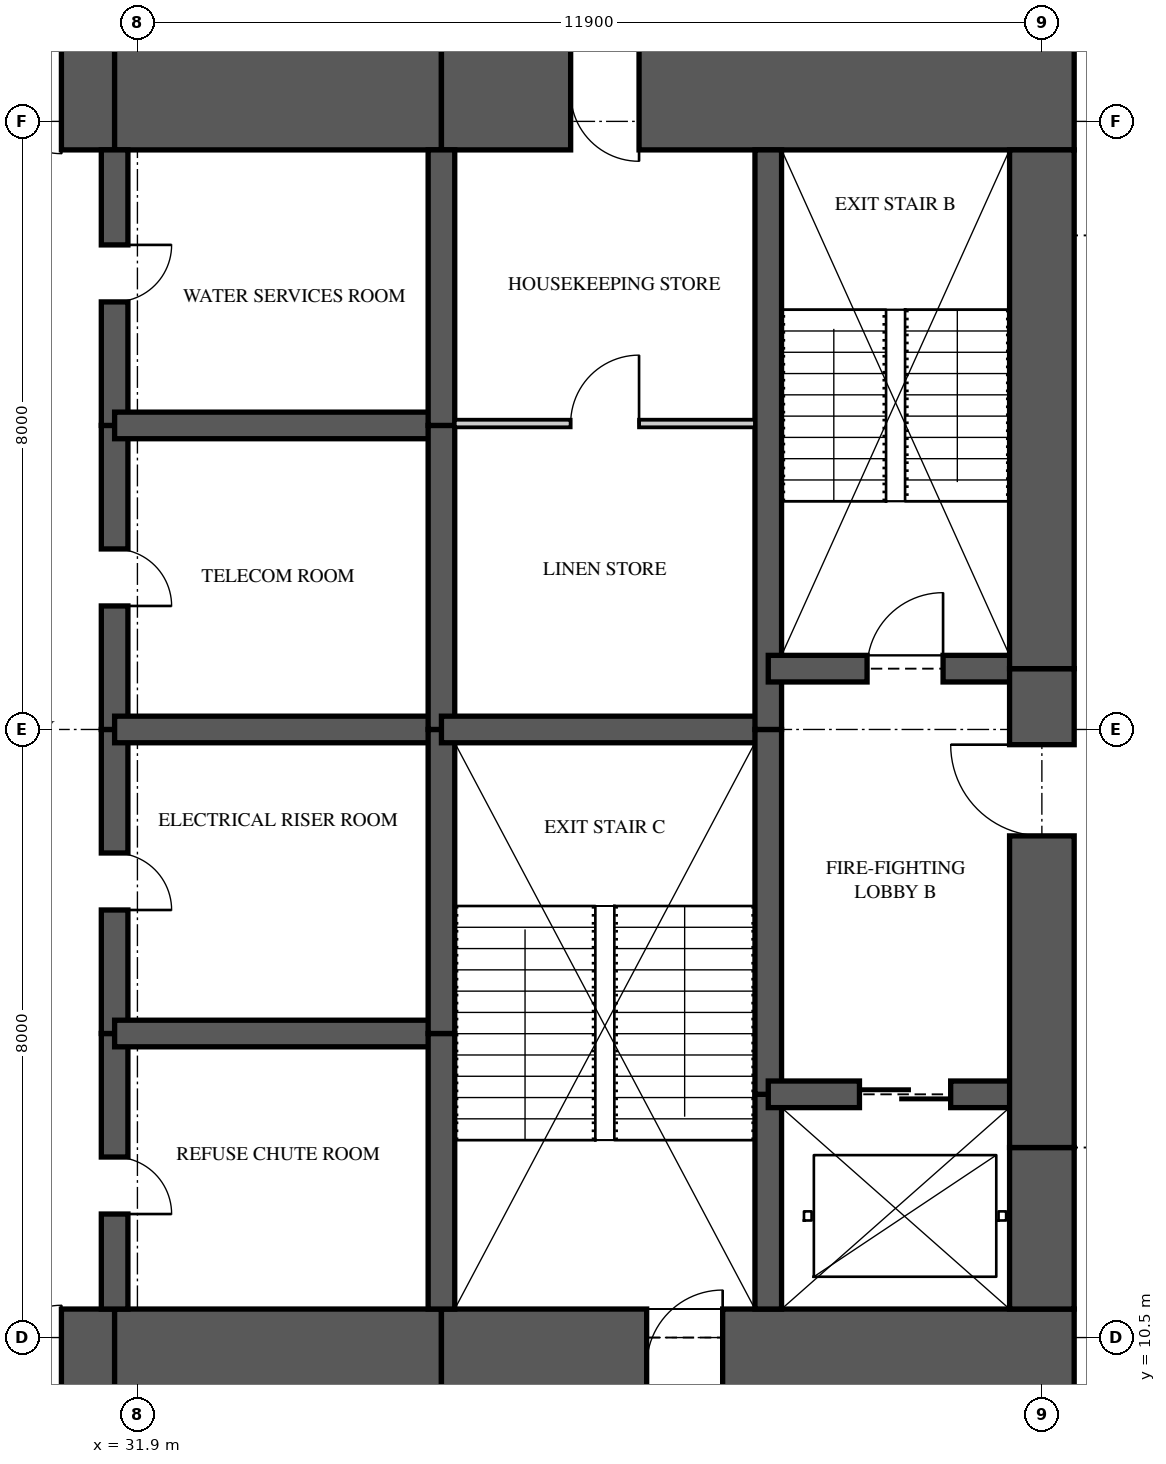
"""IFC4 building model, lengths in metres.
Left out: names, types, materials, properties, quantities, classifications, styles, units other than length and angle.
Written with IfcOpenShell. Run it as: python <this file> out.ifc"""

import sys

from ifc_helpers import new_model, si_unit, direction, frame, frame_2d, origin, place, context, subcontext, project, spatial, rectangle, extrude, element, fill, save


model = new_model("IFC4")
c1 = context("Model", 3, precision=1e-05, world=origin(), true_north=direction((0.0, 1.0)))
c2 = subcontext(c1, "Body", "Model", "MODEL_VIEW")
j1 = project(units=[si_unit("LENGTHUNIT", "METRE"), si_unit("PLANEANGLEUNIT", "RADIAN")], contexts=[c1])
p1 = place(None, origin())
s1 = spatial("IfcSite", under=j1, at=p1, CompositionType="ELEMENT")
p2 = place(p1, origin())
s2 = spatial("IfcBuilding", under=s1, at=p2, CompositionType="ELEMENT")
p3 = place(p2, frame((0.0, 0.0, 98.15)))
s3 = spatial("IfcBuildingStorey", under=s2, at=p3, CompositionType="ELEMENT", Elevation=98.15)
p4 = place(p3, frame((26.0, 10.125, 0.0), z_axis=(0.0, 0.0, 1.0), x_axis=(1.0, 0.0, 0.0)))
e1 = element("IfcWall", 1, at=p4, inside=s3, PredefinedType="SHEAR", context=c2, shape_type="SweptSolid", body=[
    extrude(rectangle(XDim=5.6, YDim=1.5, at=frame_2d((2.8, 0.0))), origin(), (0.0, 0.0, 1.0), 3.35),
])
p5 = place(p4, frame((3.3, 0.0, 0.0)))
e2 = element("IfcOpeningElement", 2, at=p5, cuts=e1, PredefinedType="OPENING", context=c2, shape_type="SweptSolid", body=[
    extrude(rectangle(XDim=1.6, YDim=2.1, at=frame_2d((0.8, 1.05))), frame((0.0, 0.76, 0.0), z_axis=(0.0, -1.0, 0.0), x_axis=(1.0, 0.0, 0.0)), (0.0, 0.0, 1.0), 1.52),
])
p6 = place(p3, frame((31.6, 10.125, 0.0), z_axis=(0.0, 0.0, 1.0), x_axis=(1.0, 0.0, 0.0)))
e3 = element("IfcWall", 3, at=p6, inside=s3, PredefinedType="SHEAR", context=c2, shape_type="SweptSolid", body=[
    extrude(rectangle(XDim=4.3, YDim=1.5, at=frame_2d((2.15, 0.0))), origin(), (0.0, 0.0, 1.0), 3.35),
])
p7 = place(p3, frame((35.9, 10.125, 0.0), z_axis=(0.0, 0.0, 1.0), x_axis=(1.0, 0.0, 0.0)))
e4 = element("IfcWall", 4, at=p7, inside=s3, PredefinedType="SHEAR", context=c2, shape_type="SweptSolid", body=[
    extrude(rectangle(XDim=8.325, YDim=1.5, at=frame_2d((4.163, 0.0))), origin(), (0.0, 0.0, 1.0), 3.35),
])
p8 = place(p7, frame((2.7, 0.0, 0.0)))
e5 = element("IfcOpeningElement", 5, at=p8, cuts=e4, PredefinedType="OPENING", context=c2, shape_type="SweptSolid", body=[
    extrude(rectangle(XDim=1.0, YDim=2.1, at=frame_2d((0.5, 1.05))), frame((0.0, 0.76, 0.0), z_axis=(0.0, -1.0, 0.0), x_axis=(1.0, 0.0, 0.0)), (0.0, 0.0, 1.0), 1.52),
])
p9 = place(p3, frame((44.225, 26.875, 0.0), z_axis=(0.0, 0.0, 1.0), x_axis=(-1.0, 0.0, 0.0)))
e6 = element("IfcWall", 6, at=p9, inside=s3, PredefinedType="SHEAR", context=c2, shape_type="SweptSolid", body=[
    extrude(rectangle(XDim=8.325, YDim=1.5, at=frame_2d((4.163, 0.0))), origin(), (0.0, 0.0, 1.0), 3.35),
])
p10 = place(p9, frame((5.725, 0.0, 0.0)))
e7 = element("IfcOpeningElement", 7, at=p10, cuts=e6, PredefinedType="OPENING", context=c2, shape_type="SweptSolid", body=[
    extrude(rectangle(XDim=0.9, YDim=2.1, at=frame_2d((0.45, 1.05))), frame((0.0, 0.76, 0.0), z_axis=(0.0, -1.0, 0.0), x_axis=(1.0, 0.0, 0.0)), (0.0, 0.0, 1.0), 1.52),
])
p11 = place(p3, frame((35.9, 26.875, 0.0), z_axis=(0.0, 0.0, 1.0), x_axis=(-1.0, 0.0, 0.0)))
e8 = element("IfcWall", 8, at=p11, inside=s3, PredefinedType="SHEAR", context=c2, shape_type="SweptSolid", body=[
    extrude(rectangle(XDim=4.3, YDim=1.5, at=frame_2d((2.15, 0.0))), origin(), (0.0, 0.0, 1.0), 3.35),
])
p12 = place(p3, frame((31.6, 26.875, 0.0), z_axis=(0.0, 0.0, 1.0), x_axis=(-1.0, 0.0, 0.0)))
e9 = element("IfcWall", 9, at=p12, inside=s3, PredefinedType="SHEAR", context=c2, shape_type="SweptSolid", body=[
    extrude(rectangle(XDim=5.6, YDim=1.5, at=frame_2d((2.8, 0.0))), origin(), (0.0, 0.0, 1.0), 3.35),
])
p13 = place(p12, frame((0.7, 0.0, 0.0)))
e10 = element("IfcOpeningElement", 10, at=p13, cuts=e9, PredefinedType="OPENING", context=c2, shape_type="SweptSolid", body=[
    extrude(rectangle(XDim=1.6, YDim=2.1, at=frame_2d((0.8, 1.05))), frame((0.0, 0.76, 0.0), z_axis=(0.0, -1.0, 0.0), x_axis=(1.0, 0.0, 0.0)), (0.0, 0.0, 1.0), 1.52),
])
p14 = place(p3, frame((43.8, 10.875, 0.0), z_axis=(0.0, 0.0, 1.0), x_axis=(0.0, 1.0, 0.0)))
e11 = element("IfcWall", 11, at=p14, inside=s3, PredefinedType="SHEAR", context=c2, shape_type="SweptSolid", body=[
    extrude(rectangle(XDim=2.125, YDim=0.85, at=frame_2d((1.062, 0.0))), origin(), (0.0, 0.0, 1.0), 3.35),
])
p15 = place(p3, frame((43.8, 13.0, 0.0), z_axis=(0.0, 0.0, 1.0), x_axis=(0.0, 1.0, 0.0)))
e12 = element("IfcWall", 12, at=p15, inside=s3, PredefinedType="SHEAR", context=c2, shape_type="SweptSolid", body=[
    extrude(rectangle(XDim=6.3, YDim=0.85, at=frame_2d((3.15, 0.0))), origin(), (0.0, 0.0, 1.0), 3.35),
])
p16 = place(p15, frame((4.1, 0.0, 0.0)))
e13 = element("IfcOpeningElement", 13, at=p16, cuts=e12, PredefinedType="OPENING", context=c2, shape_type="SweptSolid", body=[
    extrude(rectangle(XDim=1.2, YDim=2.2, at=frame_2d((0.6, 1.1))), frame((0.0, 0.435, 0.0), z_axis=(0.0, -1.0, 0.0), x_axis=(1.0, 0.0, 0.0)), (0.0, 0.0, 1.0), 0.87),
])
p17 = place(p3, frame((43.8, 19.3, 0.0), z_axis=(0.0, 0.0, 1.0), x_axis=(0.0, 1.0, 0.0)))
e14 = element("IfcWall", 14, at=p17, inside=s3, PredefinedType="SHEAR", context=c2, shape_type="SweptSolid", body=[
    extrude(rectangle(XDim=6.825, YDim=0.85, at=frame_2d((3.413, 0.0))), origin(), (0.0, 0.0, 1.0), 3.35),
])
p18 = place(p3, frame((31.6, 10.875, 0.0), z_axis=(0.0, 0.0, 1.0), x_axis=(0.0, 1.0, 0.0)))
e15 = element("IfcWall", 15, at=p18, inside=s3, PredefinedType="SHEAR", context=c2, shape_type="SweptSolid", body=[
    extrude(rectangle(XDim=3.625, YDim=0.35, at=frame_2d((1.812, 0.0))), origin(), (0.0, 0.0, 1.0), 3.35),
])
p19 = place(p18, frame((1.25, 0.0, 0.0)))
e16 = element("IfcOpeningElement", 16, at=p19, cuts=e15, PredefinedType="OPENING", context=c2, shape_type="SweptSolid", body=[
    extrude(rectangle(XDim=0.75, YDim=2.1, at=frame_2d((0.375, 1.05))), frame((0.0, 0.185, 0.0), z_axis=(0.0, -1.0, 0.0), x_axis=(1.0, 0.0, 0.0)), (0.0, 0.0, 1.0), 0.37),
])
p20 = place(p3, frame((31.6, 14.5, 0.0), z_axis=(0.0, 0.0, 1.0), x_axis=(0.0, 1.0, 0.0)))
e17 = element("IfcWall", 17, at=p20, inside=s3, PredefinedType="SHEAR", context=c2, shape_type="SweptSolid", body=[
    extrude(rectangle(XDim=4.0, YDim=0.35, at=frame_2d((2.0, 0.0))), origin(), (0.0, 0.0, 1.0), 3.35),
])
p21 = place(p20, frame((1.625, 0.0, 0.0)))
e18 = element("IfcOpeningElement", 18, at=p21, cuts=e17, PredefinedType="OPENING", context=c2, shape_type="SweptSolid", body=[
    extrude(rectangle(XDim=0.75, YDim=2.1, at=frame_2d((0.375, 1.05))), frame((0.0, 0.185, 0.0), z_axis=(0.0, -1.0, 0.0), x_axis=(1.0, 0.0, 0.0)), (0.0, 0.0, 1.0), 0.37),
])
p22 = place(p3, frame((31.6, 18.5, 0.0), z_axis=(0.0, 0.0, 1.0), x_axis=(0.0, 1.0, 0.0)))
e19 = element("IfcWall", 19, at=p22, inside=s3, PredefinedType="SHEAR", context=c2, shape_type="SweptSolid", body=[
    extrude(rectangle(XDim=4.0, YDim=0.35, at=frame_2d((2.0, 0.0))), origin(), (0.0, 0.0, 1.0), 3.35),
])
p23 = place(p22, frame((1.625, 0.0, 0.0)))
e20 = element("IfcOpeningElement", 20, at=p23, cuts=e19, PredefinedType="OPENING", context=c2, shape_type="SweptSolid", body=[
    extrude(rectangle(XDim=0.75, YDim=2.1, at=frame_2d((0.375, 1.05))), frame((0.0, 0.185, 0.0), z_axis=(0.0, -1.0, 0.0), x_axis=(1.0, 0.0, 0.0)), (0.0, 0.0, 1.0), 0.37),
])
p24 = place(p3, frame((31.6, 22.5, 0.0), z_axis=(0.0, 0.0, 1.0), x_axis=(0.0, 1.0, 0.0)))
e21 = element("IfcWall", 21, at=p24, inside=s3, PredefinedType="SHEAR", context=c2, shape_type="SweptSolid", body=[
    extrude(rectangle(XDim=3.625, YDim=0.35, at=frame_2d((1.812, 0.0))), origin(), (0.0, 0.0, 1.0), 3.35),
])
p25 = place(p24, frame((1.625, 0.0, 0.0)))
e22 = element("IfcOpeningElement", 22, at=p25, cuts=e21, PredefinedType="OPENING", context=c2, shape_type="SweptSolid", body=[
    extrude(rectangle(XDim=0.75, YDim=2.1, at=frame_2d((0.375, 1.05))), frame((0.0, 0.185, 0.0), z_axis=(0.0, -1.0, 0.0), x_axis=(1.0, 0.0, 0.0)), (0.0, 0.0, 1.0), 0.37),
])
p26 = place(p3, frame((35.9, 10.875, 0.0), z_axis=(0.0, 0.0, 1.0), x_axis=(0.0, 1.0, 0.0)))
e23 = element("IfcWall", 23, at=p26, inside=s3, PredefinedType="SHEAR", context=c2, shape_type="SweptSolid", body=[
    extrude(rectangle(XDim=3.625, YDim=0.35, at=frame_2d((1.812, 0.0))), origin(), (0.0, 0.0, 1.0), 3.35),
])
for number, where, z_axis, x_axis in (
    (24, (35.9, 14.5, 0.0), (0.0, 0.0, 1.0), (0.0, 1.0, 0.0)),
    (25, (35.9, 18.5, 0.0), (0.0, 0.0, 1.0), (0.0, 1.0, 0.0)),
):
    element("IfcWall", number, at=place(p3, frame(where, z_axis=z_axis, x_axis=x_axis)), inside=s3, PredefinedType="SHEAR", context=c2, shape_type="SweptSolid", body=[
        extrude(rectangle(XDim=4.0, YDim=0.35, at=frame_2d((2.0, 0.0))), origin(), (0.0, 0.0, 1.0), 3.35),
    ])
p27 = place(p3, frame((35.9, 22.5, 0.0), z_axis=(0.0, 0.0, 1.0), x_axis=(0.0, 1.0, 0.0)))
e26 = element("IfcWall", 26, at=p27, inside=s3, PredefinedType="SHEAR", context=c2, shape_type="SweptSolid", body=[
    extrude(rectangle(XDim=3.625, YDim=0.35, at=frame_2d((1.812, 0.0))), origin(), (0.0, 0.0, 1.0), 3.35),
])
p28 = place(p3, frame((40.2, 10.875, 0.0), z_axis=(0.0, 0.0, 1.0), x_axis=(0.0, 1.0, 0.0)))
e27 = element("IfcWall", 27, at=p28, inside=s3, PredefinedType="SHEAR", context=c2, shape_type="SweptSolid", body=[
    extrude(rectangle(XDim=2.825, YDim=0.35, at=frame_2d((1.413, 0.0))), origin(), (0.0, 0.0, 1.0), 3.35),
])
p29 = place(p3, frame((40.2, 13.7, 0.0), z_axis=(0.0, 0.0, 1.0), x_axis=(0.0, 1.0, 0.0)))
e28 = element("IfcWall", 28, at=p29, inside=s3, PredefinedType="SHEAR", context=c2, shape_type="SweptSolid", body=[
    extrude(rectangle(XDim=4.8, YDim=0.35, at=frame_2d((2.4, 0.0))), origin(), (0.0, 0.0, 1.0), 3.35),
])
p30 = place(p3, frame((40.2, 18.5, 0.0), z_axis=(0.0, 0.0, 1.0), x_axis=(0.0, 1.0, 0.0)))
e29 = element("IfcWall", 29, at=p30, inside=s3, PredefinedType="SHEAR", context=c2, shape_type="SweptSolid", body=[
    extrude(rectangle(XDim=7.625, YDim=0.35, at=frame_2d((3.812, 0.0))), origin(), (0.0, 0.0, 1.0), 3.35),
])
for number, where, z_axis, x_axis in (
    (30, (31.6, 14.5, 0.0), (0.0, 0.0, 1.0), (1.0, 0.0, 0.0)),
    (31, (31.6, 18.5, 0.0), (0.0, 0.0, 1.0), (1.0, 0.0, 0.0)),
    (32, (31.6, 22.5, 0.0), (0.0, 0.0, 1.0), (1.0, 0.0, 0.0)),
):
    element("IfcWall", number, at=place(p3, frame(where, z_axis=z_axis, x_axis=x_axis)), inside=s3, PredefinedType="SHEAR", context=c2, shape_type="SweptSolid", body=[
        extrude(rectangle(XDim=4.3, YDim=0.35, at=frame_2d((2.15, 0.0))), origin(), (0.0, 0.0, 1.0), 3.35),
    ])
p31 = place(p3, frame((35.9, 18.5, 0.0), z_axis=(0.0, 0.0, 1.0), x_axis=(1.0, 0.0, 0.0)))
e33 = element("IfcWall", 33, at=p31, inside=s3, PredefinedType="SHEAR", context=c2, shape_type="SweptSolid", body=[
    extrude(rectangle(XDim=4.3, YDim=0.35, at=frame_2d((2.15, 0.0))), origin(), (0.0, 0.0, 1.0), 3.35),
])
p32 = place(p3, frame((40.2, 13.7, 0.0), z_axis=(0.0, 0.0, 1.0), x_axis=(1.0, 0.0, 0.0)))
e34 = element("IfcWall", 34, at=p32, inside=s3, PredefinedType="SHEAR", context=c2, shape_type="SweptSolid", body=[
    extrude(rectangle(XDim=3.6, YDim=0.35, at=frame_2d((1.8, 0.0))), origin(), (0.0, 0.0, 1.0), 3.35),
])
p33 = place(p32, frame((1.2, 0.0, 0.0)))
e35 = element("IfcOpeningElement", 35, at=p33, cuts=e34, PredefinedType="OPENING", context=c2, shape_type="SweptSolid", body=[
    extrude(rectangle(XDim=1.2, YDim=2.1, at=frame_2d((0.6, 1.05))), frame((0.0, 0.185, 0.0), z_axis=(0.0, -1.0, 0.0), x_axis=(1.0, 0.0, 0.0)), (0.0, 0.0, 1.0), 0.37),
])
p34 = place(p3, frame((40.2, 19.3, 0.0), z_axis=(0.0, 0.0, 1.0), x_axis=(1.0, 0.0, 0.0)))
e36 = element("IfcWall", 36, at=p34, inside=s3, PredefinedType="SHEAR", context=c2, shape_type="SweptSolid", body=[
    extrude(rectangle(XDim=3.6, YDim=0.35, at=frame_2d((1.8, 0.0))), origin(), (0.0, 0.0, 1.0), 3.35),
])
p35 = place(p34, frame((1.3, 0.0, 0.0)))
e37 = element("IfcOpeningElement", 37, at=p35, cuts=e36, PredefinedType="OPENING", context=c2, shape_type="SweptSolid", body=[
    extrude(rectangle(XDim=1.0, YDim=2.1, at=frame_2d((0.5, 1.05))), frame((0.0, 0.185, 0.0), z_axis=(0.0, -1.0, 0.0), x_axis=(1.0, 0.0, 0.0)), (0.0, 0.0, 1.0), 0.37),
])
p36 = place(p3, frame((36.075, 22.525, 0.0), z_axis=(0.0, 0.0, 1.0), x_axis=(1.0, 0.0, 0.0)))
e38 = element("IfcWall", 38, at=p36, inside=s3, PredefinedType="PARTITIONING", context=c2, shape_type="SweptSolid", body=[
    extrude(rectangle(XDim=3.95, YDim=0.1, at=frame_2d((1.975, 0.0))), origin(), (0.0, 0.0, 1.0), 3.11),
])
p37 = place(p36, frame((1.525, 0.0, 0.0)))
e39 = element("IfcOpeningElement", 39, at=p37, cuts=e38, PredefinedType="OPENING", context=c2, shape_type="SweptSolid", body=[
    extrude(rectangle(XDim=0.9, YDim=2.1, at=frame_2d((0.45, 1.05))), frame((0.0, 0.06, 0.0), z_axis=(0.0, -1.0, 0.0), x_axis=(1.0, 0.0, 0.0)), (0.0, 0.0, 1.0), 0.12),
])
p38 = place(p37, origin())
e40 = element("IfcDoor", 40, at=p38, inside=s3, OperationType="SINGLE_SWING_RIGHT", PredefinedType="DOOR", context=c2, shape_type="SweptSolid", body=[
    extrude(rectangle(XDim=0.9, YDim=2.1, at=frame_2d((0.45, 1.05))), frame((0.0, 0.025, 0.0), z_axis=(0.0, -1.0, 0.0), x_axis=(1.0, 0.0, 0.0)), (0.0, 0.0, 1.0), 0.05),
])
fill(e39, e40)
p39 = place(p35, origin())
e41 = element("IfcDoor", 41, at=p39, inside=s3, OperationType="SINGLE_SWING_RIGHT", PredefinedType="DOOR", context=c2, shape_type="SweptSolid", body=[
    extrude(rectangle(XDim=1.0, YDim=2.1, at=frame_2d((0.5, 1.05))), frame((0.0, 0.025, 0.0), z_axis=(0.0, -1.0, 0.0), x_axis=(1.0, 0.0, 0.0)), (0.0, 0.0, 1.0), 0.05),
])
fill(e37, e41)
p40 = place(p16, origin())
e42 = element("IfcDoor", 42, at=p40, inside=s3, OperationType="SINGLE_SWING_RIGHT", PredefinedType="DOOR", context=c2, shape_type="SweptSolid", body=[
    extrude(rectangle(XDim=1.2, YDim=2.2, at=frame_2d((0.6, 1.1))), frame((0.0, 0.025, 0.0), z_axis=(0.0, -1.0, 0.0), x_axis=(1.0, 0.0, 0.0)), (0.0, 0.0, 1.0), 0.05),
])
fill(e13, e42)
p41 = place(p33, origin())
e43 = element("IfcDoor", 43, at=p41, inside=s3, OperationType="SLIDING_TO_LEFT", PredefinedType="DOOR", context=c2, shape_type="SweptSolid", body=[
    extrude(rectangle(XDim=1.2, YDim=2.1, at=frame_2d((0.6, 1.05))), frame((0.0, 0.025, 0.0), z_axis=(0.0, -1.0, 0.0), x_axis=(1.0, 0.0, 0.0)), (0.0, 0.0, 1.0), 0.05),
])
fill(e35, e43)
p42 = place(p5, origin())
e44 = element("IfcDoor", 44, at=p42, inside=s3, OperationType="DOUBLE_DOOR_SINGLE_SWING", PredefinedType="DOOR", context=c2, shape_type="SweptSolid", body=[
    extrude(rectangle(XDim=1.6, YDim=2.1, at=frame_2d((0.8, 1.05))), frame((0.0, 0.025, 0.0), z_axis=(0.0, -1.0, 0.0), x_axis=(1.0, 0.0, 0.0)), (0.0, 0.0, 1.0), 0.05),
])
fill(e2, e44)
p43 = place(p13, origin())
e45 = element("IfcDoor", 45, at=p43, inside=s3, OperationType="DOUBLE_DOOR_SINGLE_SWING", PredefinedType="DOOR", context=c2, shape_type="SweptSolid", body=[
    extrude(rectangle(XDim=1.6, YDim=2.1, at=frame_2d((0.8, 1.05))), frame((0.0, 0.025, 0.0), z_axis=(0.0, -1.0, 0.0), x_axis=(1.0, 0.0, 0.0)), (0.0, 0.0, 1.0), 0.05),
])
fill(e10, e45)
p44 = place(p19, frame((0.75, 0.0, 0.0), z_axis=(0.0, 0.0, 1.0), x_axis=(-1.0, 0.0, 0.0)))
e46 = element("IfcDoor", 46, at=p44, inside=s3, OperationType="SINGLE_SWING_RIGHT", PredefinedType="DOOR", context=c2, shape_type="SweptSolid", body=[
    extrude(rectangle(XDim=0.75, YDim=2.1, at=frame_2d((0.375, 1.05))), frame((0.0, 0.025, 0.0), z_axis=(0.0, -1.0, 0.0), x_axis=(1.0, 0.0, 0.0)), (0.0, 0.0, 1.0), 0.05),
])
fill(e16, e46)
p45 = place(p21, frame((0.75, 0.0, 0.0), z_axis=(0.0, 0.0, 1.0), x_axis=(-1.0, 0.0, 0.0)))
e47 = element("IfcDoor", 47, at=p45, inside=s3, OperationType="SINGLE_SWING_RIGHT", PredefinedType="DOOR", context=c2, shape_type="SweptSolid", body=[
    extrude(rectangle(XDim=0.75, YDim=2.1, at=frame_2d((0.375, 1.05))), frame((0.0, 0.025, 0.0), z_axis=(0.0, -1.0, 0.0), x_axis=(1.0, 0.0, 0.0)), (0.0, 0.0, 1.0), 0.05),
])
fill(e18, e47)
p46 = place(p23, frame((0.75, 0.0, 0.0), z_axis=(0.0, 0.0, 1.0), x_axis=(-1.0, 0.0, 0.0)))
e48 = element("IfcDoor", 48, at=p46, inside=s3, OperationType="SINGLE_SWING_RIGHT", PredefinedType="DOOR", context=c2, shape_type="SweptSolid", body=[
    extrude(rectangle(XDim=0.75, YDim=2.1, at=frame_2d((0.375, 1.05))), frame((0.0, 0.025, 0.0), z_axis=(0.0, -1.0, 0.0), x_axis=(1.0, 0.0, 0.0)), (0.0, 0.0, 1.0), 0.05),
])
fill(e20, e48)
p47 = place(p25, frame((0.75, 0.0, 0.0), z_axis=(0.0, 0.0, 1.0), x_axis=(-1.0, 0.0, 0.0)))
e49 = element("IfcDoor", 49, at=p47, inside=s3, OperationType="SINGLE_SWING_LEFT", PredefinedType="DOOR", context=c2, shape_type="SweptSolid", body=[
    extrude(rectangle(XDim=0.75, YDim=2.1, at=frame_2d((0.375, 1.05))), frame((0.0, 0.025, 0.0), z_axis=(0.0, -1.0, 0.0), x_axis=(1.0, 0.0, 0.0)), (0.0, 0.0, 1.0), 0.05),
])
fill(e22, e49)
p48 = place(p8, origin())
e50 = element("IfcDoor", 50, at=p48, inside=s3, OperationType="SINGLE_SWING_RIGHT", PredefinedType="DOOR", context=c2, shape_type="SweptSolid", body=[
    extrude(rectangle(XDim=1.0, YDim=2.1, at=frame_2d((0.5, 1.05))), frame((0.0, 0.025, 0.0), z_axis=(0.0, -1.0, 0.0), x_axis=(1.0, 0.0, 0.0)), (0.0, 0.0, 1.0), 0.05),
])
fill(e5, e50)
p49 = place(p10, origin())
e51 = element("IfcDoor", 51, at=p49, inside=s3, OperationType="SINGLE_SWING_LEFT", PredefinedType="DOOR", context=c2, shape_type="SweptSolid", body=[
    extrude(rectangle(XDim=0.9, YDim=2.1, at=frame_2d((0.45, 1.05))), frame((0.0, 0.47, 0.0), z_axis=(0.0, -1.0, 0.0), x_axis=(1.0, 0.0, 0.0)), (0.0, 0.0, 1.0), 0.8),
])
fill(e7, e51)
save(model, sys.argv[1])
